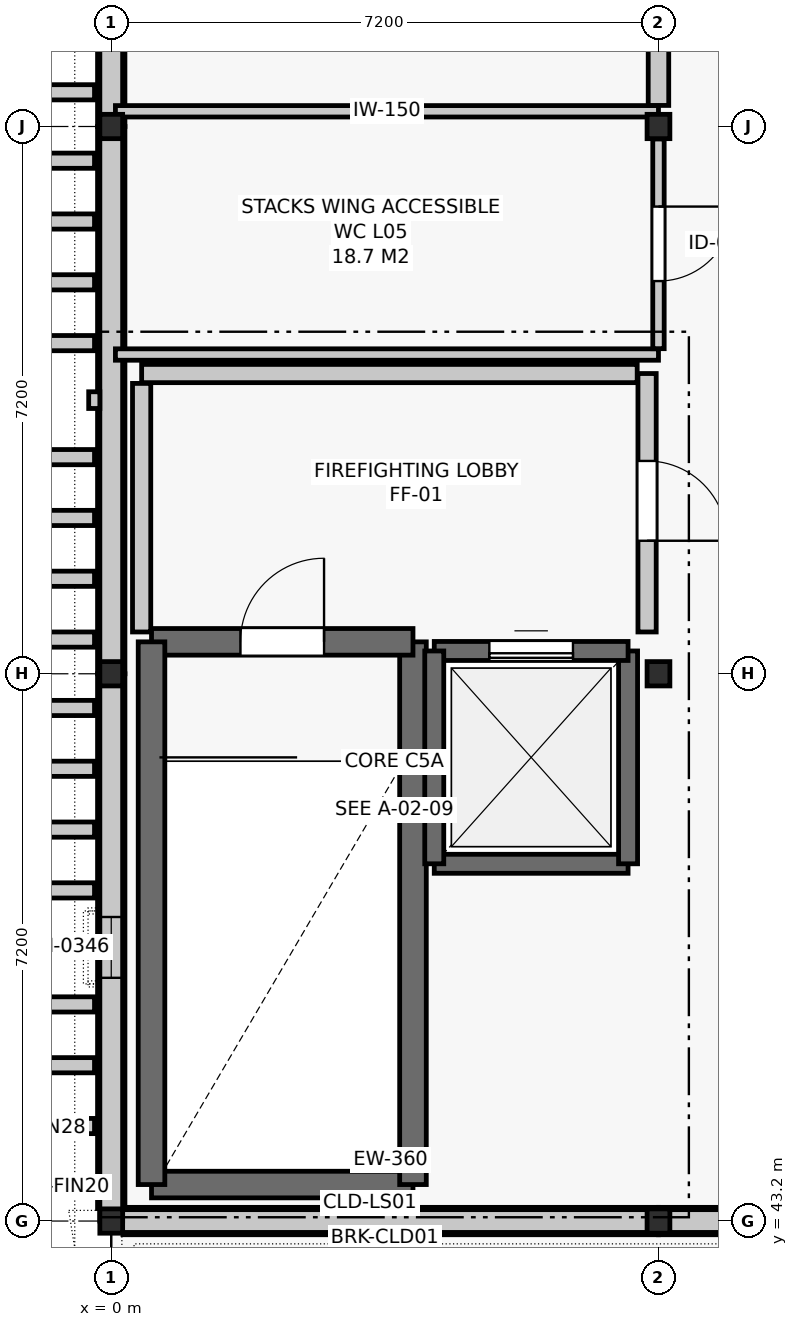
"""IFC4 building model, lengths in metres.
Left out: names, types, materials, properties, quantities, classifications, styles, units other than length and angle.
Written with IfcOpenShell. Run it as: python <this file> out.ifc"""

import sys

from ifc_helpers import new_model, si_unit, direction, frame, frame_2d, origin, origin_2d, place, context, subcontext, project, spatial, rectangle, i_section, extrude, element, fill, save


model = new_model("IFC4")
c1 = context("Model", 3, precision=1e-05, world=origin(), true_north=direction((0.0, 1.0)))
c2 = subcontext(c1, "Body", "Model", "MODEL_VIEW")
j1 = project(units=[si_unit("LENGTHUNIT", "METRE"), si_unit("PLANEANGLEUNIT", "RADIAN")], contexts=[c1])
p1 = place(None, origin())
s1 = spatial("IfcSite", under=j1, at=p1, CompositionType="ELEMENT")
p2 = place(p1, origin())
s2 = spatial("IfcBuilding", under=s1, at=p2, CompositionType="ELEMENT")
p3 = place(p2, frame((0.0, 0.0, 22.8)))
s3 = spatial("IfcBuildingStorey", under=s2, at=p3, CompositionType="ELEMENT", Elevation=22.8)
for number, where, z_axis, x_axis in (
    (1, (0.0, 43.2, 0.0), (0.0, 0.0, 1.0), (1.0, 0.0, 0.0)),
    (2, (0.0, 50.4, 0.0), (0.0, 0.0, 1.0), (1.0, 0.0, 0.0)),
    (3, (0.0, 57.6, 0.0), (0.0, 0.0, 1.0), (1.0, 0.0, 0.0)),
    (4, (7.2, 43.2, 0.0), (0.0, 0.0, 1.0), (1.0, 0.0, 0.0)),
    (5, (7.2, 50.4, 0.0), (0.0, 0.0, 1.0), (1.0, 0.0, 0.0)),
    (6, (7.2, 57.6, 0.0), (0.0, 0.0, 1.0), (1.0, 0.0, 0.0)),
):
    element("IfcColumn", number, at=place(p3, frame(where, z_axis=z_axis, x_axis=x_axis)), inside=s3, PredefinedType="COLUMN", context=c2, shape_type="SweptSolid", body=[
        extrude(i_section(OverallWidth=0.3, OverallDepth=0.32, WebThickness=0.011, FlangeThickness=0.021, FilletRadius=0.027, at=origin_2d()), origin(), (0.0, 0.0, 1.0), 4.2),
    ])
p4 = place(p3, frame((0.154, 43.2, 0.0), z_axis=(0.0, 0.0, 1.0), x_axis=(1.0, 0.0, 0.0)))
e7 = element("IfcWall", 7, at=p4, inside=s3, PredefinedType="SOLIDWALL", context=c2, shape_type="SweptSolid", body=[
    extrude(rectangle(XDim=7.046, YDim=0.36, at=frame_2d((3.523, 0.0))), origin(), (0.0, 0.0, 1.0), 3.24),
])
p5 = place(p3, frame((7.2, 43.2, 0.0), z_axis=(0.0, 0.0, 1.0), x_axis=(1.0, 0.0, 0.0)))
e8 = element("IfcWall", 8, at=p5, inside=s3, PredefinedType="SOLIDWALL", context=c2, shape_type="SweptSolid", body=[
    extrude(rectangle(XDim=7.2, YDim=0.36, at=frame_2d((3.6, 0.0))), origin(), (0.0, 0.0, 1.0), 3.24),
])
p6 = place(p5, frame((3.05, 0.0, 0.0)))
e9 = element("IfcOpeningElement", 9, at=p6, cuts=e8, PredefinedType="OPENING", context=c2, shape_type="SweptSolid", body=[
    extrude(rectangle(XDim=1.1, YDim=2.2, at=frame_2d((0.55, 1.1))), frame((0.0, 0.192, 0.0), z_axis=(0.0, -1.0, 0.0), x_axis=(1.0, 0.0, 0.0)), (0.0, 0.0, 1.0), 0.384),
])
p7 = place(p3, frame((0.0, 64.8, 0.0), z_axis=(0.0, 0.0, 1.0), x_axis=(0.0, -1.0, 0.0)))
e10 = element("IfcWall", 10, at=p7, inside=s3, PredefinedType="SOLIDWALL", context=c2, shape_type="SweptSolid", body=[
    extrude(rectangle(XDim=7.2, YDim=0.36, at=frame_2d((3.6, 0.0))), origin(), (0.0, 0.0, 1.0), 3.08),
])
p8 = place(p7, frame((3.2, 0.0, 0.95)))
e11 = element("IfcOpeningElement", 11, at=p8, cuts=e10, PredefinedType="OPENING", context=c2, shape_type="SweptSolid", body=[
    extrude(rectangle(XDim=0.8, YDim=2.15, at=frame_2d((0.4, 1.075))), frame((0.0, 0.192, 0.0), z_axis=(0.0, -1.0, 0.0), x_axis=(1.0, 0.0, 0.0)), (0.0, 0.0, 1.0), 0.384),
])
p9 = place(p3, frame((0.0, 57.6, 0.0), z_axis=(0.0, 0.0, 1.0), x_axis=(0.0, -1.0, 0.0)))
e12 = element("IfcWall", 12, at=p9, inside=s3, PredefinedType="SOLIDWALL", context=c2, shape_type="SweptSolid", body=[
    extrude(rectangle(XDim=7.2, YDim=0.36, at=frame_2d((3.6, 0.0))), origin(), (0.0, 0.0, 1.0), 3.08),
])
p10 = place(p3, frame((0.0, 50.4, 0.0), z_axis=(0.0, 0.0, 1.0), x_axis=(0.0, -1.0, 0.0)))
e13 = element("IfcWall", 13, at=p10, inside=s3, PredefinedType="SOLIDWALL", context=c2, shape_type="SweptSolid", body=[
    extrude(rectangle(XDim=7.036, YDim=0.36, at=frame_2d((3.518, 0.0))), origin(), (0.0, 0.0, 1.0), 3.08),
])
p11 = place(p10, frame((3.2, 0.0, 0.95)))
e14 = element("IfcOpeningElement", 14, at=p11, cuts=e13, PredefinedType="OPENING", context=c2, shape_type="SweptSolid", body=[
    extrude(rectangle(XDim=0.8, YDim=2.15, at=frame_2d((0.4, 1.075))), frame((0.0, 0.192, 0.0), z_axis=(0.0, -1.0, 0.0), x_axis=(1.0, 0.0, 0.0)), (0.0, 0.0, 1.0), 0.384),
])
p12 = place(p3, frame((0.0, 43.2, 4.2), z_axis=(0.0, 0.0, 1.0), x_axis=(1.0, 0.0, 0.0)))
e15 = element("IfcWall", 15, at=p12, inside=s3, PredefinedType="PARAPET", context=c2, shape_type="SweptSolid", body=[
    extrude(rectangle(XDim=21.6, YDim=0.3, at=frame_2d((10.8, 0.0))), origin(), (0.0, 0.0, 1.0), 1.2),
])
p13 = place(p3, frame((0.0, 108.0, 4.2), z_axis=(0.0, 0.0, 1.0), x_axis=(0.0, -1.0, 0.0)))
e16 = element("IfcWall", 16, at=p13, inside=s3, PredefinedType="PARAPET", context=c2, shape_type="SweptSolid", body=[
    extrude(rectangle(XDim=64.8, YDim=0.3, at=frame_2d((32.4, 0.0))), origin(), (0.0, 0.0, 1.0), 1.2),
])
for number, where, z_axis, x_axis in (
    (17, (-1.66, 43.65, 0.0), (0.0, 0.0, 1.0), (1.0, 0.0, 0.0)),
    (18, (-1.66, 44.45, 0.0), (0.0, 0.0, 1.0), (1.0, 0.0, 0.0)),
    (19, (-1.66, 45.25, 0.0), (0.0, 0.0, 1.0), (1.0, 0.0, 0.0)),
    (20, (-1.66, 46.05, 0.0), (0.0, 0.0, 1.0), (1.0, 0.0, 0.0)),
    (21, (-1.66, 47.55, 0.0), (0.0, 0.0, 1.0), (1.0, 0.0, 0.0)),
    (22, (-1.66, 48.35, 0.0), (0.0, 0.0, 1.0), (1.0, 0.0, 0.0)),
    (23, (-1.66, 49.15, 0.0), (0.0, 0.0, 1.0), (1.0, 0.0, 0.0)),
    (24, (-1.66, 49.95, 0.0), (0.0, 0.0, 1.0), (1.0, 0.0, 0.0)),
    (25, (-1.66, 50.85, 0.0), (0.0, 0.0, 1.0), (1.0, 0.0, 0.0)),
    (26, (-1.66, 51.65, 0.0), (0.0, 0.0, 1.0), (1.0, 0.0, 0.0)),
    (27, (-1.66, 52.45, 0.0), (0.0, 0.0, 1.0), (1.0, 0.0, 0.0)),
    (28, (-1.66, 53.25, 0.0), (0.0, 0.0, 1.0), (1.0, 0.0, 0.0)),
    (29, (-1.66, 54.75, 0.0), (0.0, 0.0, 1.0), (1.0, 0.0, 0.0)),
    (30, (-1.66, 55.55, 0.0), (0.0, 0.0, 1.0), (1.0, 0.0, 0.0)),
    (31, (-1.66, 56.35, 0.0), (0.0, 0.0, 1.0), (1.0, 0.0, 0.0)),
    (32, (-1.66, 57.15, 0.0), (0.0, 0.0, 1.0), (1.0, 0.0, 0.0)),
    (33, (-1.66, 58.05, 0.0), (0.0, 0.0, 1.0), (1.0, 0.0, 0.0)),
):
    element("IfcWall", number, at=place(p3, frame(where, z_axis=z_axis, x_axis=x_axis)), inside=s3, PredefinedType="SOLIDWALL", context=c2, shape_type="SweptSolid", body=[
        extrude(rectangle(XDim=1.44, YDim=0.2, at=frame_2d((0.72, 0.0))), origin(), (0.0, 0.0, 1.0), 4.2),
    ])
p14 = place(p3, frame((0.53, 43.68, 0.0), z_axis=(0.0, 0.0, 1.0), x_axis=(1.0, 0.0, 0.0)))
e34 = element("IfcWall", 34, at=p14, inside=s3, PredefinedType="SHEAR", context=c2, shape_type="SweptSolid", body=[
    extrude(rectangle(XDim=3.44, YDim=0.35, at=frame_2d((1.72, 0.0))), origin(), (0.0, 0.0, 1.0), 3.96),
])
p15 = place(p3, frame((3.97, 43.68, 0.0), z_axis=(0.0, 0.0, 1.0), x_axis=(0.0, 1.0, 0.0)))
e35 = element("IfcWall", 35, at=p15, inside=s3, PredefinedType="SHEAR", context=c2, shape_type="SweptSolid", body=[
    extrude(rectangle(XDim=7.14, YDim=0.35, at=frame_2d((3.57, 0.0))), origin(), (0.0, 0.0, 1.0), 3.96),
])
p16 = place(p3, frame((3.97, 50.82, 0.0), z_axis=(0.0, 0.0, 1.0), x_axis=(-1.0, 0.0, 0.0)))
e36 = element("IfcWall", 36, at=p16, inside=s3, PredefinedType="SHEAR", context=c2, shape_type="SweptSolid", body=[
    extrude(rectangle(XDim=3.44, YDim=0.35, at=frame_2d((1.72, 0.0))), origin(), (0.0, 0.0, 1.0), 3.96),
])
p17 = place(p16, frame((1.17, 0.0, 0.0)))
e37 = element("IfcOpeningElement", 37, at=p17, cuts=e36, PredefinedType="OPENING", context=c2, shape_type="SweptSolid", body=[
    extrude(rectangle(XDim=1.1, YDim=2.15, at=frame_2d((0.55, 1.075))), frame((0.0, 0.187, 0.0), z_axis=(0.0, -1.0, 0.0), x_axis=(1.0, 0.0, 0.0)), (0.0, 0.0, 1.0), 0.374),
])
p18 = place(p3, frame((0.53, 50.82, 0.0), z_axis=(0.0, 0.0, 1.0), x_axis=(0.0, -1.0, 0.0)))
e38 = element("IfcWall", 38, at=p18, inside=s3, PredefinedType="SHEAR", context=c2, shape_type="SweptSolid", body=[
    extrude(rectangle(XDim=7.14, YDim=0.35, at=frame_2d((3.57, 0.0))), origin(), (0.0, 0.0, 1.0), 3.96),
])
p19 = place(p3, frame((7.05, 50.95, 0.0), z_axis=(0.0, 0.0, 1.0), x_axis=(0.0, 1.0, 0.0)))
e39 = element("IfcWall", 39, at=p19, inside=s3, PredefinedType="SOLIDWALL", context=c2, shape_type="SweptSolid", body=[
    extrude(rectangle(XDim=3.4, YDim=0.24, at=frame_2d((1.7, 0.0))), origin(), (0.0, 0.0, 1.0), 3.22),
])
p20 = place(p19, frame((1.2, 0.0, 0.0)))
e40 = element("IfcOpeningElement", 40, at=p20, cuts=e39, PredefinedType="OPENING", context=c2, shape_type="SweptSolid", body=[
    extrude(rectangle(XDim=1.05, YDim=2.15, at=frame_2d((0.525, 1.075))), frame((0.0, 0.132, 0.0), z_axis=(0.0, -1.0, 0.0), x_axis=(1.0, 0.0, 0.0)), (0.0, 0.0, 1.0), 0.264),
])
p21 = place(p3, frame((0.4, 54.35, 0.0), z_axis=(0.0, 0.0, 1.0), x_axis=(1.0, 0.0, 0.0)))
e41 = element("IfcWall", 41, at=p21, inside=s3, PredefinedType="SOLIDWALL", context=c2, shape_type="SweptSolid", body=[
    extrude(rectangle(XDim=6.52, YDim=0.24, at=frame_2d((3.26, 0.0))), origin(), (0.0, 0.0, 1.0), 3.22),
])
p22 = place(p3, frame((0.4, 50.95, 0.0), z_axis=(0.0, 0.0, 1.0), x_axis=(0.0, 1.0, 0.0)))
e42 = element("IfcWall", 42, at=p22, inside=s3, PredefinedType="SOLIDWALL", context=c2, shape_type="SweptSolid", body=[
    extrude(rectangle(XDim=3.27, YDim=0.24, at=frame_2d((1.635, 0.0))), origin(), (0.0, 0.0, 1.0), 3.22),
])
p23 = place(p3, frame((4.25, 47.9, 0.0), z_axis=(0.0, 0.0, 1.0), x_axis=(1.0, 0.0, 0.0)))
e43 = element("IfcWall", 43, at=p23, inside=s3, PredefinedType="SHEAR", context=c2, shape_type="SweptSolid", body=[
    extrude(rectangle(XDim=2.55, YDim=0.25, at=frame_2d((1.275, 0.0))), origin(), (0.0, 0.0, 1.0), 3.96),
])
p24 = place(p3, frame((6.8, 47.9, 0.0), z_axis=(0.0, 0.0, 1.0), x_axis=(0.0, 1.0, 0.0)))
e44 = element("IfcWall", 44, at=p24, inside=s3, PredefinedType="SHEAR", context=c2, shape_type="SweptSolid", body=[
    extrude(rectangle(XDim=2.8, YDim=0.25, at=frame_2d((1.4, 0.0))), origin(), (0.0, 0.0, 1.0), 3.96),
])
p25 = place(p3, frame((6.8, 50.7, 0.0), z_axis=(0.0, 0.0, 1.0), x_axis=(-1.0, 0.0, 0.0)))
e45 = element("IfcWall", 45, at=p25, inside=s3, PredefinedType="SHEAR", context=c2, shape_type="SweptSolid", body=[
    extrude(rectangle(XDim=2.55, YDim=0.25, at=frame_2d((1.275, 0.0))), origin(), (0.0, 0.0, 1.0), 3.96),
])
p26 = place(p25, frame((0.725, 0.0, 0.0)))
e46 = element("IfcOpeningElement", 46, at=p26, cuts=e45, PredefinedType="OPENING", context=c2, shape_type="SweptSolid", body=[
    extrude(rectangle(XDim=1.1, YDim=2.1, at=frame_2d((0.55, 1.05))), frame((0.0, 0.137, 0.0), z_axis=(0.0, -1.0, 0.0), x_axis=(1.0, 0.0, 0.0)), (0.0, 0.0, 1.0), 0.274),
])
p27 = place(p3, frame((4.25, 50.7, 0.0), z_axis=(0.0, 0.0, 1.0), x_axis=(0.0, -1.0, 0.0)))
e47 = element("IfcWall", 47, at=p27, inside=s3, PredefinedType="SHEAR", context=c2, shape_type="SweptSolid", body=[
    extrude(rectangle(XDim=2.8, YDim=0.25, at=frame_2d((1.4, 0.0))), origin(), (0.0, 0.0, 1.0), 3.96),
])
for number, where, z_axis, x_axis in (
    (48, (0.055, 54.6, 0.0), (0.0, 0.0, 1.0), (1.0, 0.0, 0.0)),
    (49, (0.055, 57.8, 0.0), (0.0, 0.0, 1.0), (1.0, 0.0, 0.0)),
):
    element("IfcWall", number, at=place(p3, frame(where, z_axis=z_axis, x_axis=x_axis)), inside=s3, PredefinedType="PARTITIONING", context=c2, shape_type="SweptSolid", body=[
        extrude(rectangle(XDim=7.145, YDim=0.15, at=frame_2d((3.573, 0.0))), origin(), (0.0, 0.0, 1.0), 3.192),
    ])
p28 = place(p3, frame((7.2, 54.677, 0.0), z_axis=(0.0, 0.0, 1.0), x_axis=(0.0, 1.0, 0.0)))
e50 = element("IfcWall", 50, at=p28, inside=s3, PredefinedType="PARTITIONING", context=c2, shape_type="SweptSolid", body=[
    extrude(rectangle(XDim=2.759, YDim=0.15, at=frame_2d((1.379, 0.0))), origin(), (0.0, 0.0, 1.0), 3.405),
])
p29 = place(p28, frame((0.889, 0.0, 0.0)))
e51 = element("IfcOpeningElement", 51, at=p29, cuts=e50, PredefinedType="OPENING", context=c2, shape_type="SweptSolid", body=[
    extrude(rectangle(XDim=0.98, YDim=2.1, at=frame_2d((0.49, 1.05))), frame((0.0, 0.087, 0.0), z_axis=(0.0, -1.0, 0.0), x_axis=(1.0, 0.0, 0.0)), (0.0, 0.0, 1.0), 0.174),
])
p30 = place(p3, frame((7.2, 57.877, 0.0), z_axis=(0.0, 0.0, 1.0), x_axis=(0.0, 1.0, 0.0)))
e52 = element("IfcWall", 52, at=p30, inside=s3, PredefinedType="SOLIDWALL", context=c2, shape_type="SweptSolid", body=[
    extrude(rectangle(XDim=6.759, YDim=0.27, at=frame_2d((3.379, 0.0))), origin(), (0.0, 0.0, 1.0), 3.405),
])
p31 = place(p11, origin())
e53 = element("IfcWindow", 53, at=p31, inside=s3, PartitioningType="SINGLE_PANEL", PredefinedType="WINDOW", context=c2, shape_type="SweptSolid", body=[
    extrude(rectangle(XDim=0.8, YDim=2.15, at=frame_2d((0.4, 1.075))), frame((0.0, 0.03, 0.0), z_axis=(0.0, -1.0, 0.0), x_axis=(1.0, 0.0, 0.0)), (0.0, 0.0, 1.0), 0.06),
])
fill(e14, e53)
p32 = place(p17, frame((1.1, 0.0, 0.0), z_axis=(0.0, 0.0, 1.0), x_axis=(-1.0, 0.0, 0.0)))
e54 = element("IfcDoor", 54, at=p32, inside=s3, OperationType="SINGLE_SWING_RIGHT", PredefinedType="DOOR", context=c2, shape_type="SweptSolid", body=[
    extrude(rectangle(XDim=1.1, YDim=2.15, at=frame_2d((0.55, 1.075))), frame((0.0, 0.025, 0.0), z_axis=(0.0, -1.0, 0.0), x_axis=(1.0, 0.0, 0.0)), (0.0, 0.0, 1.0), 0.05),
])
fill(e37, e54)
p33 = place(p20, frame((1.05, 0.0, 0.0), z_axis=(0.0, 0.0, 1.0), x_axis=(-1.0, 0.0, 0.0)))
e55 = element("IfcDoor", 55, at=p33, inside=s3, OperationType="SINGLE_SWING_RIGHT", PredefinedType="DOOR", context=c2, shape_type="SweptSolid", body=[
    extrude(rectangle(XDim=1.05, YDim=2.15, at=frame_2d((0.525, 1.075))), frame((0.0, 0.025, 0.0), z_axis=(0.0, -1.0, 0.0), x_axis=(1.0, 0.0, 0.0)), (0.0, 0.0, 1.0), 0.05),
])
fill(e40, e55)
p34 = place(p26, origin())
e56 = element("IfcDoor", 56, at=p34, inside=s3, OperationType="SLIDING_TO_RIGHT", PredefinedType="DOOR", context=c2, shape_type="SweptSolid", body=[
    extrude(rectangle(XDim=1.1, YDim=2.1, at=frame_2d((0.55, 1.05))), frame((0.0, 0.025, 0.0), z_axis=(0.0, -1.0, 0.0), x_axis=(1.0, 0.0, 0.0)), (0.0, 0.0, 1.0), 0.05),
])
fill(e46, e56)
p35 = place(p29, frame((0.98, 0.0, 0.0), z_axis=(0.0, 0.0, 1.0), x_axis=(-1.0, 0.0, 0.0)))
e57 = element("IfcDoor", 57, at=p35, inside=s3, OperationType="SINGLE_SWING_LEFT", PredefinedType="DOOR", context=c2, shape_type="SweptSolid", body=[
    extrude(rectangle(XDim=0.98, YDim=2.1, at=frame_2d((0.49, 1.05))), frame((0.0, 0.025, 0.0), z_axis=(0.0, -1.0, 0.0), x_axis=(1.0, 0.0, 0.0)), (0.0, 0.0, 1.0), 0.05),
])
fill(e51, e57)
save(model, sys.argv[1])
